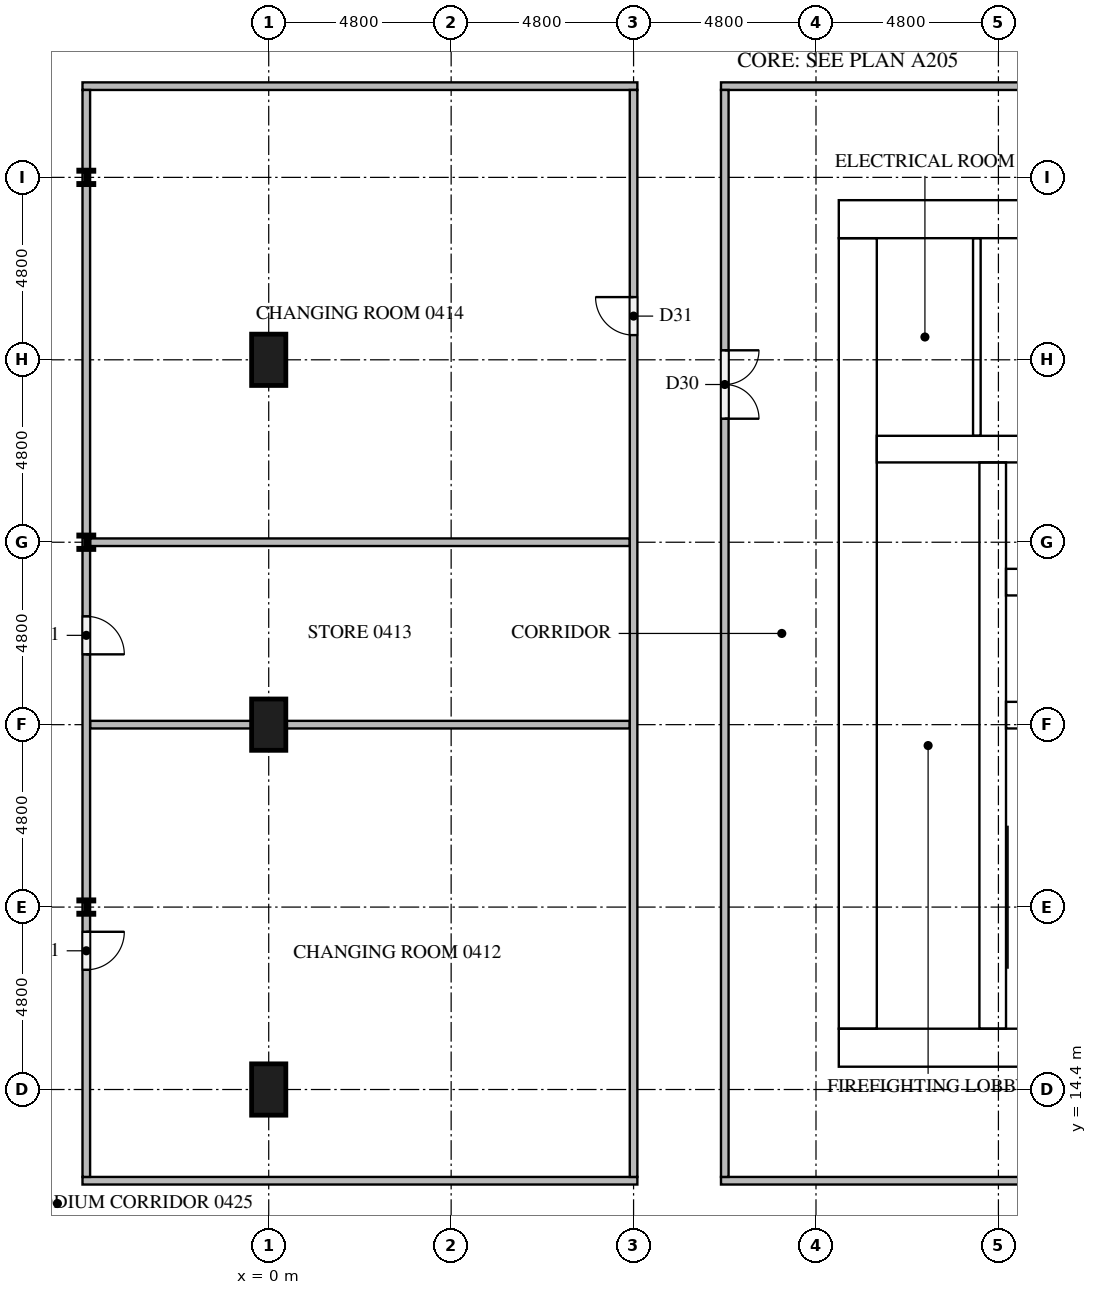
"""IFC4 building model, lengths in metres.
Left out: names, types, materials, properties, quantities, classifications, styles, units other than length and angle.
Written with IfcOpenShell. Run it as: python <this file> out.ifc"""

import sys

from ifc_helpers import new_model, si_unit, direction, frame, frame_2d, origin, origin_2d, place, context, subcontext, project, spatial, rectangle, i_section, extrude, element, fill, save


model = new_model("IFC4")
c1 = context("Model", 3, precision=1e-05, world=origin(), true_north=direction((0.0, 1.0)))
c2 = subcontext(c1, "Body", "Model", "MODEL_VIEW")
j1 = project(units=[si_unit("LENGTHUNIT", "METRE"), si_unit("PLANEANGLEUNIT", "RADIAN")], contexts=[c1])
p1 = place(None, origin())
s1 = spatial("IfcSite", under=j1, at=p1, CompositionType="ELEMENT")
p2 = place(p1, origin())
s2 = spatial("IfcBuilding", under=s1, at=p2, CompositionType="ELEMENT")
p3 = place(p2, frame((0.0, 0.0, 19.5)))
s3 = spatial("IfcBuildingStorey", under=s2, at=p3, CompositionType="ELEMENT", Elevation=19.5)
p4 = place(p3, frame((15.0, 15.5, 0.0), z_axis=(0.0, 0.0, 1.0), x_axis=(1.0, 0.0, 0.0)))
e1 = element("IfcWall", 1, at=p4, inside=s3, PredefinedType="SHEAR", context=c2, shape_type="SweptSolid", body=[
    extrude(rectangle(XDim=32.4, YDim=1.0, at=frame_2d((16.2, 0.0))), origin(), (0.0, 0.0, 1.0), 4.1),
])
p5 = place(p4, frame((15.3, 0.0, 0.0)))
e2 = element("IfcOpeningElement", 2, at=p5, cuts=e1, PredefinedType="OPENING", context=c2, shape_type="SweptSolid", body=[
    extrude(rectangle(XDim=1.8, YDim=2.1, at=frame_2d((0.9, 1.05))), frame((0.0, 0.51, 0.0), z_axis=(0.0, -1.0, 0.0), x_axis=(1.0, 0.0, 0.0)), (0.0, 0.0, 1.0), 1.02),
])
p6 = place(p3, frame((15.0, 37.3, 0.0), z_axis=(0.0, 0.0, 1.0), x_axis=(1.0, 0.0, 0.0)))
e3 = element("IfcWall", 3, at=p6, inside=s3, PredefinedType="SHEAR", context=c2, shape_type="SweptSolid", body=[
    extrude(rectangle(XDim=32.4, YDim=1.0, at=frame_2d((16.2, 0.0))), origin(), (0.0, 0.0, 1.0), 4.1),
])
p7 = place(p6, frame((15.3, 0.0, 0.0)))
e4 = element("IfcOpeningElement", 4, at=p7, cuts=e3, PredefinedType="OPENING", context=c2, shape_type="SweptSolid", body=[
    extrude(rectangle(XDim=1.8, YDim=2.1, at=frame_2d((0.9, 1.05))), frame((0.0, 0.51, 0.0), z_axis=(0.0, -1.0, 0.0), x_axis=(1.0, 0.0, 0.0)), (0.0, 0.0, 1.0), 1.02),
])
p8 = place(p6, frame((1.766, 0.0, 0.0)))
e5 = element("IfcOpeningElement", 5, at=p8, cuts=e3, PredefinedType="OPENING", context=c2, shape_type="SweptSolid", body=[
    extrude(rectangle(XDim=1.0, YDim=2.1, at=frame_2d((0.5, 1.05))), frame((0.0, 0.51, 0.0), z_axis=(0.0, -1.0, 0.0), x_axis=(1.0, 0.0, 0.0)), (0.0, 0.0, 1.0), 1.02),
])
p9 = place(p6, frame((5.241, 0.0, 0.0)))
e6 = element("IfcOpeningElement", 6, at=p9, cuts=e3, PredefinedType="OPENING", context=c2, shape_type="SweptSolid", body=[
    extrude(rectangle(XDim=1.0, YDim=2.1, at=frame_2d((0.5, 1.05))), frame((0.0, 0.51, 0.0), z_axis=(0.0, -1.0, 0.0), x_axis=(1.0, 0.0, 0.0)), (0.0, 0.0, 1.0), 1.02),
])
p10 = place(p3, frame((15.5, 16.0, 0.0), z_axis=(0.0, 0.0, 1.0), x_axis=(0.0, 1.0, 0.0)))
e7 = element("IfcWall", 7, at=p10, inside=s3, PredefinedType="SHEAR", context=c2, shape_type="SweptSolid", body=[
    extrude(rectangle(XDim=20.8, YDim=1.0, at=frame_2d((10.4, 0.0))), origin(), (0.0, 0.0, 1.0), 4.1),
])
p11 = place(p10, frame((4.76, 0.0, 0.0)))
e8 = element("IfcOpeningElement", 8, at=p11, cuts=e7, PredefinedType="OPENING", context=c2, shape_type="SweptSolid", body=[
    extrude(rectangle(XDim=1.2, YDim=2.1, at=frame_2d((0.6, 1.05))), frame((0.0, 0.51, 0.0), z_axis=(0.0, -1.0, 0.0), x_axis=(1.0, 0.0, 0.0)), (0.0, 0.0, 1.0), 1.02),
])
p12 = place(p3, frame((19.05, 16.0, 0.0), z_axis=(0.0, 0.0, 1.0), x_axis=(0.0, 1.0, 0.0)))
e9 = element("IfcWall", 9, at=p12, inside=s3, PredefinedType="SHEAR", context=c2, shape_type="SweptSolid", body=[
    extrude(rectangle(XDim=14.9, YDim=0.7, at=frame_2d((7.45, 0.0))), origin(), (0.0, 0.0, 1.0), 4.1),
])
p13 = place(p12, frame((9.45, 0.0, 0.0)))
e10 = element("IfcOpeningElement", 10, at=p13, cuts=e9, PredefinedType="OPENING", context=c2, shape_type="SweptSolid", body=[
    extrude(rectangle(XDim=1.1, YDim=2.1, at=frame_2d((0.55, 1.05))), frame((0.0, 0.36, 0.0), z_axis=(0.0, -1.0, 0.0), x_axis=(1.0, 0.0, 0.0)), (0.0, 0.0, 1.0), 0.72),
])
p14 = place(p12, frame((12.95, 0.0, 0.0)))
e11 = element("IfcOpeningElement", 11, at=p14, cuts=e9, PredefinedType="OPENING", context=c2, shape_type="SweptSolid", body=[
    extrude(rectangle(XDim=1.1, YDim=2.1, at=frame_2d((0.55, 1.05))), frame((0.0, 0.36, 0.0), z_axis=(0.0, -1.0, 0.0), x_axis=(1.0, 0.0, 0.0)), (0.0, 0.0, 1.0), 0.72),
])
p15 = place(p12, frame((0.2, 0.0, 0.0)))
e12 = element("IfcOpeningElement", 12, at=p15, cuts=e9, PredefinedType="OPENING", context=c2, shape_type="SweptSolid", body=[
    extrude(rectangle(XDim=1.2, YDim=2.1, at=frame_2d((0.6, 1.05))), frame((0.0, 0.36, 0.0), z_axis=(0.0, -1.0, 0.0), x_axis=(1.0, 0.0, 0.0)), (0.0, 0.0, 1.0), 0.72),
])
for number, where, z_axis, x_axis in (
    (13, (19.4, 24.25, 0.0), (0.0, 0.0, 1.0), (1.0, 0.0, 0.0)),
    (14, (19.4, 27.75, 0.0), (0.0, 0.0, 1.0), (1.0, 0.0, 0.0)),
):
    element("IfcWall", number, at=place(p3, frame(where, z_axis=z_axis, x_axis=x_axis)), inside=s3, PredefinedType="SHEAR", context=c2, shape_type="SweptSolid", body=[
        extrude(rectangle(XDim=3.35, YDim=0.7, at=frame_2d((1.675, 0.0))), origin(), (0.0, 0.0, 1.0), 4.1),
    ])
p16 = place(p3, frame((16.0, 31.25, 0.0), z_axis=(0.0, 0.0, 1.0), x_axis=(1.0, 0.0, 0.0)))
e15 = element("IfcWall", 15, at=p16, inside=s3, PredefinedType="SHEAR", context=c2, shape_type="SweptSolid", body=[
    extrude(rectangle(XDim=6.75, YDim=0.7, at=frame_2d((3.375, 0.0))), origin(), (0.0, 0.0, 1.0), 4.1),
])
for number, where, z_axis, x_axis in (
    (16, (0.0, 33.6, 0.0), (0.0, 0.0, 1.0), (0.0, 1.0, 0.0)),
    (17, (0.0, 24.0, 0.0), (0.0, 0.0, 1.0), (0.0, 1.0, 0.0)),
    (18, (0.0, 14.4, 0.0), (0.0, 0.0, 1.0), (0.0, 1.0, 0.0)),
):
    element("IfcColumn", number, at=place(p3, frame(where, z_axis=z_axis, x_axis=x_axis)), inside=s3, PredefinedType="COLUMN", context=c2, shape_type="SweptSolid", body=[
        extrude(rectangle(XDim=1.35, YDim=0.9, at=origin_2d()), origin(), (0.0, 0.0, 1.0), 4.1),
    ])
for number, where, z_axis, x_axis in (
    (19, (-4.8, 19.2, 0.0), (0.0, 0.0, 1.0), (1.0, 0.0, 0.0)),
    (20, (-4.8, 28.8, 0.0), (0.0, 0.0, 1.0), (1.0, 0.0, 0.0)),
    (21, (-4.8, 38.4, 0.0), (0.0, 0.0, 1.0), (1.0, 0.0, 0.0)),
):
    element("IfcColumn", number, at=place(p3, frame(where, z_axis=z_axis, x_axis=x_axis)), inside=s3, PredefinedType="COLUMN", context=c2, shape_type="SweptSolid", body=[
        extrude(i_section(OverallWidth=0.396, OverallDepth=0.381, WebThickness=0.019, FlangeThickness=0.03, at=origin_2d()), origin(), (0.0, 0.0, 1.0), 4.1),
    ])
p17 = place(p3, frame((18.633, 31.6, 0.0), z_axis=(0.0, 0.0, 1.0), x_axis=(0.0, 1.0, 0.0)))
e22 = element("IfcWall", 22, at=p17, inside=s3, PredefinedType="PARTITIONING", context=c2, shape_type="SweptSolid", body=[
    extrude(rectangle(XDim=5.2, YDim=0.2, at=frame_2d((2.6, 0.0))), origin(), (0.0, 0.0, 1.0), 4.1),
])
p18 = place(p3, frame((-4.9, 12.0, 0.0), z_axis=(0.0, 0.0, 1.0), x_axis=(1.0, 0.0, 0.0)))
e23 = element("IfcWall", 23, at=p18, inside=s3, PredefinedType="PARTITIONING", context=c2, shape_type="SweptSolid", body=[
    extrude(rectangle(XDim=14.6, YDim=0.2, at=frame_2d((7.3, 0.0))), origin(), (0.0, 0.0, 1.0), 4.1),
])
p19 = place(p3, frame((11.9, 12.0, 0.0), z_axis=(0.0, 0.0, 1.0), x_axis=(1.0, 0.0, 0.0)))
e24 = element("IfcWall", 24, at=p19, inside=s3, PredefinedType="PARTITIONING", context=c2, shape_type="SweptSolid", body=[
    extrude(rectangle(XDim=38.6, YDim=0.2, at=frame_2d((19.3, 0.0))), origin(), (0.0, 0.0, 1.0), 4.1),
])
p20 = place(p19, frame((18.45, 0.0, 0.0)))
e25 = element("IfcOpeningElement", 25, at=p20, cuts=e24, PredefinedType="OPENING", context=c2, shape_type="SweptSolid", body=[
    extrude(rectangle(XDim=1.8, YDim=2.1, at=frame_2d((0.9, 1.05))), frame((0.0, 0.11, 0.0), z_axis=(0.0, -1.0, 0.0), x_axis=(1.0, 0.0, 0.0)), (0.0, 0.0, 1.0), 0.22),
])
for number, where, z_axis, x_axis in (
    (26, (-4.7, 24.0, 0.0), (0.0, 0.0, 1.0), (1.0, 0.0, 0.0)),
    (27, (-4.7, 28.8, 0.0), (0.0, 0.0, 1.0), (1.0, 0.0, 0.0)),
):
    element("IfcWall", number, at=place(p3, frame(where, z_axis=z_axis, x_axis=x_axis)), inside=s3, PredefinedType="PARTITIONING", context=c2, shape_type="SweptSolid", body=[
        extrude(rectangle(XDim=14.2, YDim=0.2, at=frame_2d((7.1, 0.0))), origin(), (0.0, 0.0, 1.0), 4.1),
    ])
p21 = place(p3, frame((-4.9, 40.8, 0.0), z_axis=(0.0, 0.0, 1.0), x_axis=(1.0, 0.0, 0.0)))
e28 = element("IfcWall", 28, at=p21, inside=s3, PredefinedType="PARTITIONING", context=c2, shape_type="SweptSolid", body=[
    extrude(rectangle(XDim=14.6, YDim=0.2, at=frame_2d((7.3, 0.0))), origin(), (0.0, 0.0, 1.0), 4.1),
])
p22 = place(p3, frame((50.5, 40.8, 0.0), z_axis=(0.0, 0.0, 1.0), x_axis=(-1.0, 0.0, 0.0)))
e29 = element("IfcWall", 29, at=p22, inside=s3, PredefinedType="PARTITIONING", context=c2, shape_type="SweptSolid", body=[
    extrude(rectangle(XDim=38.6, YDim=0.2, at=frame_2d((19.3, 0.0))), origin(), (0.0, 0.0, 1.0), 4.1),
])
p23 = place(p22, frame((18.45, 0.0, 0.0)))
e30 = element("IfcOpeningElement", 30, at=p23, cuts=e29, PredefinedType="OPENING", context=c2, shape_type="SweptSolid", body=[
    extrude(rectangle(XDim=1.8, YDim=2.1, at=frame_2d((0.9, 1.05))), frame((0.0, 0.11, 0.0), z_axis=(0.0, -1.0, 0.0), x_axis=(1.0, 0.0, 0.0)), (0.0, 0.0, 1.0), 0.22),
])
p24 = place(p22, frame((16.25, 0.0, 0.0)))
e31 = element("IfcOpeningElement", 31, at=p24, cuts=e29, PredefinedType="OPENING", context=c2, shape_type="SweptSolid", body=[
    extrude(rectangle(XDim=1.8, YDim=2.1, at=frame_2d((0.9, 1.05))), frame((0.0, 0.11, 0.0), z_axis=(0.0, -1.0, 0.0), x_axis=(1.0, 0.0, 0.0)), (0.0, 0.0, 1.0), 0.22),
])
p25 = place(p3, frame((-4.8, 40.7, 0.0), z_axis=(0.0, 0.0, 1.0), x_axis=(0.0, -1.0, 0.0)))
e32 = element("IfcWall", 32, at=p25, inside=s3, PredefinedType="PARTITIONING", context=c2, shape_type="SweptSolid", body=[
    extrude(rectangle(XDim=28.6, YDim=0.2, at=frame_2d((14.3, 0.0))), origin(), (0.0, 0.0, 1.0), 4.1),
])
p26 = place(p25, frame((22.15, 0.0, 0.0)))
e33 = element("IfcOpeningElement", 33, at=p26, cuts=e32, PredefinedType="OPENING", context=c2, shape_type="SweptSolid", body=[
    extrude(rectangle(XDim=1.0, YDim=2.1, at=frame_2d((0.5, 1.05))), frame((0.0, 0.11, 0.0), z_axis=(0.0, -1.0, 0.0), x_axis=(1.0, 0.0, 0.0)), (0.0, 0.0, 1.0), 0.22),
])
p27 = place(p25, frame((13.85, 0.0, 0.0)))
e34 = element("IfcOpeningElement", 34, at=p27, cuts=e32, PredefinedType="OPENING", context=c2, shape_type="SweptSolid", body=[
    extrude(rectangle(XDim=1.0, YDim=2.1, at=frame_2d((0.5, 1.05))), frame((0.0, 0.11, 0.0), z_axis=(0.0, -1.0, 0.0), x_axis=(1.0, 0.0, 0.0)), (0.0, 0.0, 1.0), 0.22),
])
p28 = place(p3, frame((9.6, 12.1, 0.0), z_axis=(0.0, 0.0, 1.0), x_axis=(0.0, 1.0, 0.0)))
e35 = element("IfcWall", 35, at=p28, inside=s3, PredefinedType="PARTITIONING", context=c2, shape_type="SweptSolid", body=[
    extrude(rectangle(XDim=28.6, YDim=0.2, at=frame_2d((14.3, 0.0))), origin(), (0.0, 0.0, 1.0), 4.1),
])
p29 = place(p28, frame((22.15, 0.0, 0.0)))
e36 = element("IfcOpeningElement", 36, at=p29, cuts=e35, PredefinedType="OPENING", context=c2, shape_type="SweptSolid", body=[
    extrude(rectangle(XDim=1.0, YDim=2.1, at=frame_2d((0.5, 1.05))), frame((0.0, 0.11, 0.0), z_axis=(0.0, -1.0, 0.0), x_axis=(1.0, 0.0, 0.0)), (0.0, 0.0, 1.0), 0.22),
])
p30 = place(p3, frame((12.0, 40.7, 0.0), z_axis=(0.0, 0.0, 1.0), x_axis=(0.0, -1.0, 0.0)))
e37 = element("IfcWall", 37, at=p30, inside=s3, PredefinedType="PARTITIONING", context=c2, shape_type="SweptSolid", body=[
    extrude(rectangle(XDim=28.6, YDim=0.2, at=frame_2d((14.3, 0.0))), origin(), (0.0, 0.0, 1.0), 4.1),
])
p31 = place(p30, frame((6.85, 0.0, 0.0)))
e38 = element("IfcOpeningElement", 38, at=p31, cuts=e37, PredefinedType="OPENING", context=c2, shape_type="SweptSolid", body=[
    extrude(rectangle(XDim=1.8, YDim=2.1, at=frame_2d((0.9, 1.05))), frame((0.0, 0.11, 0.0), z_axis=(0.0, -1.0, 0.0), x_axis=(1.0, 0.0, 0.0)), (0.0, 0.0, 1.0), 0.22),
])
p32 = place(p13, origin())
e39 = element("IfcDoor", 39, at=p32, inside=s3, OperationType="DOUBLE_DOOR_SLIDING", PredefinedType="DOOR", context=c2, shape_type="SweptSolid", body=[
    extrude(rectangle(XDim=1.1, YDim=2.1, at=frame_2d((0.55, 1.05))), frame((0.0, 0.025, 0.0), z_axis=(0.0, -1.0, 0.0), x_axis=(1.0, 0.0, 0.0)), (0.0, 0.0, 1.0), 0.05),
])
fill(e10, e39)
p33 = place(p14, origin())
e40 = element("IfcDoor", 40, at=p33, inside=s3, OperationType="DOUBLE_DOOR_SLIDING", PredefinedType="DOOR", context=c2, shape_type="SweptSolid", body=[
    extrude(rectangle(XDim=1.1, YDim=2.1, at=frame_2d((0.55, 1.05))), frame((0.0, 0.025, 0.0), z_axis=(0.0, -1.0, 0.0), x_axis=(1.0, 0.0, 0.0)), (0.0, 0.0, 1.0), 0.05),
])
fill(e11, e40)
p34 = place(p15, frame((1.2, 0.0, 0.0), z_axis=(0.0, 0.0, 1.0), x_axis=(-1.0, 0.0, 0.0)))
e41 = element("IfcDoor", 41, at=p34, inside=s3, OperationType="SINGLE_SWING_RIGHT", PredefinedType="DOOR", context=c2, shape_type="SweptSolid", body=[
    extrude(rectangle(XDim=1.2, YDim=2.1, at=frame_2d((0.6, 1.05))), frame((0.0, 0.025, 0.0), z_axis=(0.0, -1.0, 0.0), x_axis=(1.0, 0.0, 0.0)), (0.0, 0.0, 1.0), 0.05),
])
fill(e12, e41)
p35 = place(p11, frame((1.2, 0.0, 0.0), z_axis=(0.0, 0.0, 1.0), x_axis=(-1.0, 0.0, 0.0)))
e42 = element("IfcDoor", 42, at=p35, inside=s3, OperationType="SINGLE_SWING_LEFT", PredefinedType="DOOR", context=c2, shape_type="SweptSolid", body=[
    extrude(rectangle(XDim=1.2, YDim=2.1, at=frame_2d((0.6, 1.05))), frame((0.0, 0.025, 0.0), z_axis=(0.0, -1.0, 0.0), x_axis=(1.0, 0.0, 0.0)), (0.0, 0.0, 1.0), 0.05),
])
fill(e8, e42)
p36 = place(p8, origin())
e43 = element("IfcDoor", 43, at=p36, inside=s3, OperationType="SINGLE_SWING_LEFT", PredefinedType="DOOR", context=c2, shape_type="SweptSolid", body=[
    extrude(rectangle(XDim=1.0, YDim=2.1, at=frame_2d((0.5, 1.05))), frame((0.0, 0.025, 0.0), z_axis=(0.0, -1.0, 0.0), x_axis=(1.0, 0.0, 0.0)), (0.0, 0.0, 1.0), 0.05),
])
fill(e5, e43)
p37 = place(p26, origin())
e44 = element("IfcDoor", 44, at=p37, inside=s3, OperationType="SINGLE_SWING_LEFT", PredefinedType="DOOR", context=c2, shape_type="SweptSolid", body=[
    extrude(rectangle(XDim=1.0, YDim=2.1, at=frame_2d((0.5, 1.05))), frame((0.0, 0.025, 0.0), z_axis=(0.0, -1.0, 0.0), x_axis=(1.0, 0.0, 0.0)), (0.0, 0.0, 1.0), 0.05),
])
fill(e33, e44)
p38 = place(p27, origin())
e45 = element("IfcDoor", 45, at=p38, inside=s3, OperationType="SINGLE_SWING_RIGHT", PredefinedType="DOOR", context=c2, shape_type="SweptSolid", body=[
    extrude(rectangle(XDim=1.0, YDim=2.1, at=frame_2d((0.5, 1.05))), frame((0.0, 0.025, 0.0), z_axis=(0.0, -1.0, 0.0), x_axis=(1.0, 0.0, 0.0)), (0.0, 0.0, 1.0), 0.05),
])
fill(e34, e45)
p39 = place(p29, origin())
e46 = element("IfcDoor", 46, at=p39, inside=s3, OperationType="SINGLE_SWING_RIGHT", PredefinedType="DOOR", context=c2, shape_type="SweptSolid", body=[
    extrude(rectangle(XDim=1.0, YDim=2.1, at=frame_2d((0.5, 1.05))), frame((0.0, 0.025, 0.0), z_axis=(0.0, -1.0, 0.0), x_axis=(1.0, 0.0, 0.0)), (0.0, 0.0, 1.0), 0.05),
])
fill(e36, e46)
p40 = place(p31, origin())
e47 = element("IfcDoor", 47, at=p40, inside=s3, OperationType="DOUBLE_DOOR_SINGLE_SWING", PredefinedType="DOOR", context=c2, shape_type="SweptSolid", body=[
    extrude(rectangle(XDim=1.8, YDim=2.1, at=frame_2d((0.9, 1.05))), frame((0.0, 0.025, 0.0), z_axis=(0.0, -1.0, 0.0), x_axis=(1.0, 0.0, 0.0)), (0.0, 0.0, 1.0), 0.05),
])
fill(e38, e47)
save(model, sys.argv[1])
